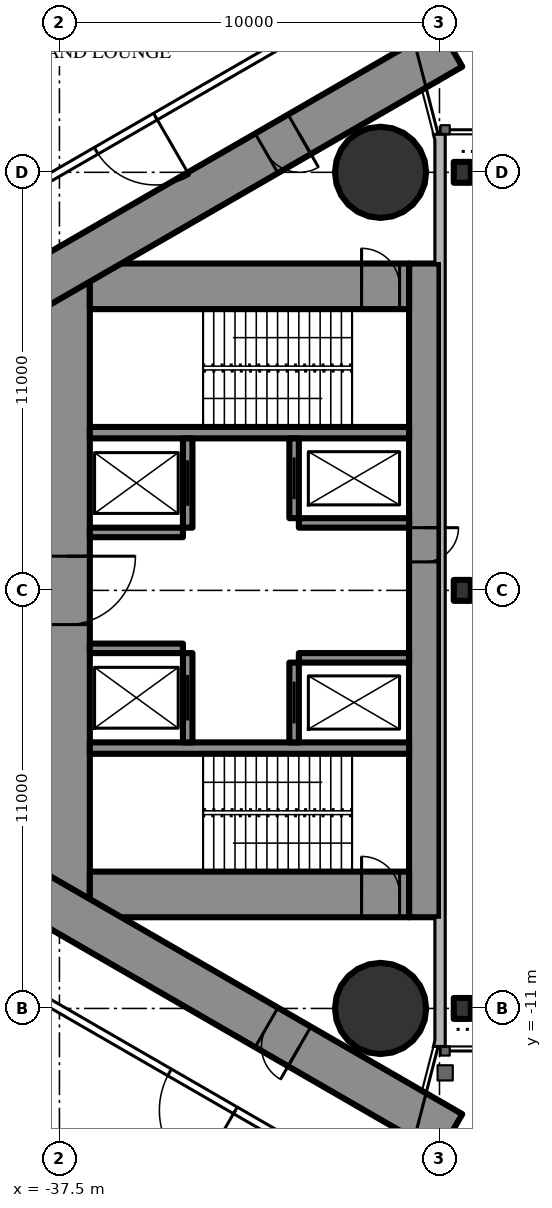
"""IFC4 building model, lengths in metres.
Left out: names, types, materials, properties, quantities, classifications, styles, units other than length and angle.
Written with IfcOpenShell. Run it as: python <this file> out.ifc"""

import sys

from ifc_helpers import new_model, si_unit, direction, frame, frame_2d, origin, origin_2d, place, context, subcontext, project, spatial, rectangle, circle, i_section, extrude, element, fill, save


model = new_model("IFC4")
c1 = context("Model", 3, precision=1e-05, world=origin(), true_north=direction((0.0, 1.0)))
c2 = subcontext(c1, "Body", "Model", "MODEL_VIEW")
j1 = project(units=[si_unit("LENGTHUNIT", "METRE"), si_unit("PLANEANGLEUNIT", "RADIAN")], contexts=[c1])
p1 = place(None, origin())
s1 = spatial("IfcSite", under=j1, at=p1, CompositionType="ELEMENT")
p2 = place(p1, origin())
s2 = spatial("IfcBuilding", under=s1, at=p2, CompositionType="ELEMENT")
p3 = place(p2, frame((0.0, 0.0, 251.9)))
s3 = spatial("IfcBuildingStorey", under=s2, at=p3, CompositionType="ELEMENT", Elevation=251.9)
for number, where, z_axis, x_axis in (
    (1, (-29.05, -11.0, 0.0), (0.0, 0.0, 1.0), (1.0, 0.0, 0.0)),
    (2, (-29.05, 11.0, 0.0), (0.0, 0.0, 1.0), (1.0, 0.0, 0.0)),
):
    element("IfcColumn", number, at=place(p3, frame(where, z_axis=z_axis, x_axis=x_axis)), inside=s3, PredefinedType="COLUMN", context=c2, shape_type="SweptSolid", body=[
        extrude(circle(Radius=1.2, at=origin_2d()), origin(), (0.0, 0.0, 1.0), 5.4),
    ])
p4 = place(p3, frame((-27.9, 8.6, 0.0), z_axis=(0.0, 0.0, 1.0), x_axis=(0.0, -1.0, 0.0)))
e3 = element("IfcWall", 3, at=p4, inside=s3, PredefinedType="SHEAR", context=c2, shape_type="SweptSolid", body=[
    extrude(rectangle(XDim=17.2, YDim=0.8, at=frame_2d((8.6, 0.0))), origin(), (0.0, 0.0, 1.0), 5.4),
])
p5 = place(p4, frame((6.95, 0.0, 0.0)))
e4 = element("IfcOpeningElement", 4, at=p5, cuts=e3, PredefinedType="OPENING", context=c2, shape_type="SweptSolid", body=[
    extrude(rectangle(XDim=0.9, YDim=2.2, at=frame_2d((0.45, 1.1))), frame((0.0, 0.41, 0.0), z_axis=(0.0, -1.0, 0.0), x_axis=(1.0, 0.0, 0.0)), (0.0, 0.0, 1.0), 0.82),
])
p6 = place(p3, frame((-37.3, 8.6, 0.0), z_axis=(0.0, 0.0, 1.0), x_axis=(0.0, -1.0, 0.0)))
e5 = element("IfcWall", 5, at=p6, inside=s3, PredefinedType="SHEAR", context=c2, shape_type="SweptSolid", body=[
    extrude(rectangle(XDim=17.2, YDim=1.2, at=frame_2d((8.6, 0.0))), origin(), (0.0, 0.0, 1.0), 5.4),
])
p7 = place(p6, frame((7.7, 0.0, 0.0)))
e6 = element("IfcOpeningElement", 6, at=p7, cuts=e5, PredefinedType="OPENING", context=c2, shape_type="SweptSolid", body=[
    extrude(rectangle(XDim=1.8, YDim=2.2, at=frame_2d((0.9, 1.1))), frame((0.0, 0.61, 0.0), z_axis=(0.0, -1.0, 0.0), x_axis=(1.0, 0.0, 0.0)), (0.0, 0.0, 1.0), 1.22),
])
p8 = place(p3, frame((-28.3, 8.0, 0.0), z_axis=(0.0, 0.0, 1.0), x_axis=(-1.0, 0.0, 0.0)))
e7 = element("IfcWall", 7, at=p8, inside=s3, PredefinedType="SHEAR", context=c2, shape_type="SweptSolid", body=[
    extrude(rectangle(XDim=8.4, YDim=1.2, at=frame_2d((4.2, 0.0))), origin(), (0.0, 0.0, 1.0), 5.4),
])
p9 = place(p8, frame((0.25, 0.0, 0.0)))
e8 = element("IfcOpeningElement", 8, at=p9, cuts=e7, PredefinedType="OPENING", context=c2, shape_type="SweptSolid", body=[
    extrude(rectangle(XDim=1.0, YDim=2.2, at=frame_2d((0.5, 1.1))), frame((0.0, 0.61, 0.0), z_axis=(0.0, -1.0, 0.0), x_axis=(1.0, 0.0, 0.0)), (0.0, 0.0, 1.0), 1.22),
])
p10 = place(p3, frame((-28.3, -8.0, 0.0), z_axis=(0.0, 0.0, 1.0), x_axis=(-1.0, 0.0, 0.0)))
e9 = element("IfcWall", 9, at=p10, inside=s3, PredefinedType="SHEAR", context=c2, shape_type="SweptSolid", body=[
    extrude(rectangle(XDim=8.4, YDim=1.2, at=frame_2d((4.2, 0.0))), origin(), (0.0, 0.0, 1.0), 5.4),
])
p11 = place(p10, frame((0.25, 0.0, 0.0)))
e10 = element("IfcOpeningElement", 10, at=p11, cuts=e9, PredefinedType="OPENING", context=c2, shape_type="SweptSolid", body=[
    extrude(rectangle(XDim=1.0, YDim=2.2, at=frame_2d((0.5, 1.1))), frame((0.0, 0.61, 0.0), z_axis=(0.0, -1.0, 0.0), x_axis=(1.0, 0.0, 0.0)), (0.0, 0.0, 1.0), 1.22),
])
for number, where, z_axis, x_axis in (
    (11, (-28.3, 4.15, 0.0), (0.0, 0.0, 1.0), (-1.0, 0.0, 0.0)),
    (12, (-28.3, -4.15, 0.0), (0.0, 0.0, 1.0), (-1.0, 0.0, 0.0)),
):
    element("IfcWall", number, at=place(p3, frame(where, z_axis=z_axis, x_axis=x_axis)), inside=s3, PredefinedType="SHEAR", context=c2, shape_type="SweptSolid", body=[
        extrude(rectangle(XDim=8.4, YDim=0.3, at=frame_2d((4.2, 0.0))), origin(), (0.0, 0.0, 1.0), 5.4),
    ])
p12 = place(p3, frame((-31.325, 4.0, 0.0), z_axis=(0.0, 0.0, 1.0), x_axis=(0.0, -1.0, 0.0)))
e13 = element("IfcWall", 13, at=p12, inside=s3, PredefinedType="SHEAR", context=c2, shape_type="SweptSolid", body=[
    extrude(rectangle(XDim=2.1, YDim=0.25, at=frame_2d((1.05, 0.0))), origin(), (0.0, 0.0, 1.0), 5.4),
])
p13 = place(p12, frame((0.5, 0.0, 0.0)))
e14 = element("IfcOpeningElement", 14, at=p13, cuts=e13, PredefinedType="OPENING", context=c2, shape_type="SweptSolid", body=[
    extrude(rectangle(XDim=1.1, YDim=2.2, at=frame_2d((0.55, 1.1))), frame((0.0, 0.135, 0.0), z_axis=(0.0, -1.0, 0.0), x_axis=(1.0, 0.0, 0.0)), (0.0, 0.0, 1.0), 0.27),
])
p14 = place(p3, frame((-34.125, 4.0, 0.0), z_axis=(0.0, 0.0, 1.0), x_axis=(0.0, -1.0, 0.0)))
e15 = element("IfcWall", 15, at=p14, inside=s3, PredefinedType="SHEAR", context=c2, shape_type="SweptSolid", body=[
    extrude(rectangle(XDim=2.35, YDim=0.25, at=frame_2d((1.175, 0.0))), origin(), (0.0, 0.0, 1.0), 5.4),
])
p15 = place(p14, frame((0.575, 0.0, 0.0)))
e16 = element("IfcOpeningElement", 16, at=p15, cuts=e15, PredefinedType="OPENING", context=c2, shape_type="SweptSolid", body=[
    extrude(rectangle(XDim=1.2, YDim=2.2, at=frame_2d((0.6, 1.1))), frame((0.0, 0.135, 0.0), z_axis=(0.0, -1.0, 0.0), x_axis=(1.0, 0.0, 0.0)), (0.0, 0.0, 1.0), 0.27),
])
p16 = place(p3, frame((-28.3, 1.775, 0.0), z_axis=(0.0, 0.0, 1.0), x_axis=(-1.0, 0.0, 0.0)))
e17 = element("IfcWall", 17, at=p16, inside=s3, PredefinedType="SHEAR", context=c2, shape_type="SweptSolid", body=[
    extrude(rectangle(XDim=2.9, YDim=0.25, at=frame_2d((1.45, 0.0))), origin(), (0.0, 0.0, 1.0), 5.4),
])
p17 = place(p3, frame((-34.25, 1.525, 0.0), z_axis=(0.0, 0.0, 1.0), x_axis=(-1.0, 0.0, 0.0)))
e18 = element("IfcWall", 18, at=p17, inside=s3, PredefinedType="SHEAR", context=c2, shape_type="SweptSolid", body=[
    extrude(rectangle(XDim=2.45, YDim=0.25, at=frame_2d((1.225, 0.0))), origin(), (0.0, 0.0, 1.0), 5.4),
])
p18 = place(p3, frame((-31.325, -1.9, 0.0), z_axis=(0.0, 0.0, 1.0), x_axis=(0.0, -1.0, 0.0)))
e19 = element("IfcWall", 19, at=p18, inside=s3, PredefinedType="SHEAR", context=c2, shape_type="SweptSolid", body=[
    extrude(rectangle(XDim=2.1, YDim=0.25, at=frame_2d((1.05, 0.0))), origin(), (0.0, 0.0, 1.0), 5.4),
])
p19 = place(p18, frame((0.5, 0.0, 0.0)))
e20 = element("IfcOpeningElement", 20, at=p19, cuts=e19, PredefinedType="OPENING", context=c2, shape_type="SweptSolid", body=[
    extrude(rectangle(XDim=1.1, YDim=2.2, at=frame_2d((0.55, 1.1))), frame((0.0, 0.135, 0.0), z_axis=(0.0, -1.0, 0.0), x_axis=(1.0, 0.0, 0.0)), (0.0, 0.0, 1.0), 0.27),
])
p20 = place(p3, frame((-34.125, -1.65, 0.0), z_axis=(0.0, 0.0, 1.0), x_axis=(0.0, -1.0, 0.0)))
e21 = element("IfcWall", 21, at=p20, inside=s3, PredefinedType="SHEAR", context=c2, shape_type="SweptSolid", body=[
    extrude(rectangle(XDim=2.35, YDim=0.25, at=frame_2d((1.175, 0.0))), origin(), (0.0, 0.0, 1.0), 5.4),
])
p21 = place(p20, frame((0.575, 0.0, 0.0)))
e22 = element("IfcOpeningElement", 22, at=p21, cuts=e21, PredefinedType="OPENING", context=c2, shape_type="SweptSolid", body=[
    extrude(rectangle(XDim=1.2, YDim=2.2, at=frame_2d((0.6, 1.1))), frame((0.0, 0.135, 0.0), z_axis=(0.0, -1.0, 0.0), x_axis=(1.0, 0.0, 0.0)), (0.0, 0.0, 1.0), 0.27),
])
p22 = place(p3, frame((-28.3, -1.775, 0.0), z_axis=(0.0, 0.0, 1.0), x_axis=(-1.0, 0.0, 0.0)))
e23 = element("IfcWall", 23, at=p22, inside=s3, PredefinedType="SHEAR", context=c2, shape_type="SweptSolid", body=[
    extrude(rectangle(XDim=2.9, YDim=0.25, at=frame_2d((1.45, 0.0))), origin(), (0.0, 0.0, 1.0), 5.4),
])
p23 = place(p3, frame((-34.25, -1.525, 0.0), z_axis=(0.0, 0.0, 1.0), x_axis=(-1.0, 0.0, 0.0)))
e24 = element("IfcWall", 24, at=p23, inside=s3, PredefinedType="SHEAR", context=c2, shape_type="SweptSolid", body=[
    extrude(rectangle(XDim=2.45, YDim=0.25, at=frame_2d((1.225, 0.0))), origin(), (0.0, 0.0, 1.0), 5.4),
])
p24 = place(p3, frame((-27.2, 14.3, 0.0), z_axis=(0.0, 0.0, 1.0), x_axis=(-0.866026593062, -0.499997940104, 0.0)))
e25 = element("IfcWall", 25, at=p24, inside=s3, PredefinedType="SHEAR", context=c2, shape_type="SweptSolid", body=[
    extrude(rectangle(XDim=28.946, YDim=1.2, at=frame_2d((14.473, 0.0))), origin(), (0.0, 0.0, 1.0), 5.4),
])
p25 = place(p24, frame((4.6, 0.0, 0.0)))
e26 = element("IfcOpeningElement", 26, at=p25, cuts=e25, PredefinedType="OPENING", context=c2, shape_type="SweptSolid", body=[
    extrude(rectangle(XDim=1.0, YDim=2.2, at=frame_2d((0.5, 1.1))), frame((0.0, 0.61, 0.0), z_axis=(0.0, -1.0, 0.0), x_axis=(1.0, 0.0, 0.0)), (0.0, 0.0, 1.0), 1.22),
])
p26 = place(p24, frame((13.395, 0.0, 0.0)))
e27 = element("IfcOpeningElement", 27, at=p26, cuts=e25, PredefinedType="OPENING", context=c2, shape_type="SweptSolid", body=[
    extrude(rectangle(XDim=1.8, YDim=2.2, at=frame_2d((0.9, 1.1))), frame((0.0, 0.61, 0.0), z_axis=(0.0, -1.0, 0.0), x_axis=(1.0, 0.0, 0.0)), (0.0, 0.0, 1.0), 1.22),
])
p27 = place(p3, frame((-27.2, -14.3, 0.0), z_axis=(0.0, 0.0, 1.0), x_axis=(-0.866024021859, 0.500002393557, 0.0)))
e28 = element("IfcWall", 28, at=p27, inside=s3, PredefinedType="SHEAR", context=c2, shape_type="SweptSolid", body=[
    extrude(rectangle(XDim=27.907, YDim=1.2, at=frame_2d((13.954, 0.0))), origin(), (0.0, 0.0, 1.0), 5.4),
])
p28 = place(p27, frame((4.6, 0.0, 0.0)))
e29 = element("IfcOpeningElement", 29, at=p28, cuts=e28, PredefinedType="OPENING", context=c2, shape_type="SweptSolid", body=[
    extrude(rectangle(XDim=1.0, YDim=2.2, at=frame_2d((0.5, 1.1))), frame((0.0, 0.61, 0.0), z_axis=(0.0, -1.0, 0.0), x_axis=(1.0, 0.0, 0.0)), (0.0, 0.0, 1.0), 1.22),
])
p29 = place(p27, frame((13.395, 0.0, 0.0)))
e30 = element("IfcOpeningElement", 30, at=p29, cuts=e28, PredefinedType="OPENING", context=c2, shape_type="SweptSolid", body=[
    extrude(rectangle(XDim=1.8, YDim=2.2, at=frame_2d((0.9, 1.1))), frame((0.0, 0.61, 0.0), z_axis=(0.0, -1.0, 0.0), x_axis=(1.0, 0.0, 0.0)), (0.0, 0.0, 1.0), 1.22),
])
for number, where, z_axis, x_axis in (
    (31, (-26.9, -11.0, 0.0), (0.0, 0.0, 1.0), (1.0, 0.0, 0.0)),
    (32, (-26.9, 0.0, 0.0), (0.0, 0.0, 1.0), (1.0, 0.0, 0.0)),
    (33, (-26.9, 11.0, 0.0), (0.0, 0.0, 1.0), (1.0, 0.0, 0.0)),
):
    element("IfcColumn", number, at=place(p3, frame(where, z_axis=z_axis, x_axis=x_axis)), inside=s3, PredefinedType="COLUMN", context=c2, shape_type="SweptSolid", body=[
        extrude(i_section(OverallWidth=0.448, OverallDepth=0.55, WebThickness=0.072, FlangeThickness=0.115, FilletRadius=0.02, at=origin_2d()), origin(), (0.0, 0.0, 1.0), 5.4),
    ])
p30 = place(p3, frame((-28.681, 16.101, 0.0), z_axis=(0.0, 0.0, 1.0), x_axis=(-0.866024860443, -0.500000941094, 0.0)))
e34 = element("IfcWall", 34, at=p30, inside=s3, PredefinedType="PARTITIONING", context=c2, shape_type="SweptSolid", body=[
    extrude(rectangle(XDim=32.201, YDim=0.2, at=frame_2d((16.101, 0.0))), origin(), (0.0, 0.0, 1.0), 5.15),
])
p31 = place(p30, frame((7.266, 0.0, 0.0)))
e35 = element("IfcOpeningElement", 35, at=p31, cuts=e34, PredefinedType="OPENING", context=c2, shape_type="SweptSolid", body=[
    extrude(rectangle(XDim=1.8, YDim=2.2, at=frame_2d((0.9, 1.1))), frame((0.0, 0.11, 0.0), z_axis=(0.0, -1.0, 0.0), x_axis=(1.0, 0.0, 0.0)), (0.0, 0.0, 1.0), 0.22),
])
p32 = place(p30, frame((17.182, 0.0, 0.0)))
e36 = element("IfcOpeningElement", 36, at=p32, cuts=e34, PredefinedType="OPENING", context=c2, shape_type="SweptSolid", body=[
    extrude(rectangle(XDim=2.0, YDim=2.4, at=frame_2d((1.0, 1.2))), frame((0.0, 0.11, 0.0), z_axis=(0.0, -1.0, 0.0), x_axis=(1.0, 0.0, 0.0)), (0.0, 0.0, 1.0), 0.22),
])
p33 = place(p30, frame((21.43, 0.0, 0.0)))
e37 = element("IfcOpeningElement", 37, at=p33, cuts=e34, PredefinedType="OPENING", context=c2, shape_type="SweptSolid", body=[
    extrude(rectangle(XDim=1.8, YDim=2.2, at=frame_2d((0.9, 1.1))), frame((0.0, 0.11, 0.0), z_axis=(0.0, -1.0, 0.0), x_axis=(1.0, 0.0, 0.0)), (0.0, 0.0, 1.0), 0.22),
])
p34 = place(p30, frame((27.29, 0.0, 0.0)))
e38 = element("IfcOpeningElement", 38, at=p34, cuts=e34, PredefinedType="OPENING", context=c2, shape_type="SweptSolid", body=[
    extrude(rectangle(XDim=1.8, YDim=2.2, at=frame_2d((0.9, 1.1))), frame((0.0, 0.11, 0.0), z_axis=(0.0, -1.0, 0.0), x_axis=(1.0, 0.0, 0.0)), (0.0, 0.0, 1.0), 0.22),
])
p35 = place(p3, frame((-28.681, -16.101, 0.0), z_axis=(0.0, 0.0, 1.0), x_axis=(-0.866026079773, 0.499998829152, 0.0)))
e39 = element("IfcWall", 39, at=p35, inside=s3, PredefinedType="PARTITIONING", context=c2, shape_type="SweptSolid", body=[
    extrude(rectangle(XDim=11.674, YDim=0.2, at=frame_2d((5.837, 0.0))), origin(), (0.0, 0.0, 1.0), 5.15),
])
p36 = place(p35, frame((4.837, 0.0, 0.0)))
e40 = element("IfcOpeningElement", 40, at=p36, cuts=e39, PredefinedType="OPENING", context=c2, shape_type="SweptSolid", body=[
    extrude(rectangle(XDim=2.0, YDim=2.4, at=frame_2d((1.0, 1.2))), frame((0.0, 0.11, 0.0), z_axis=(0.0, -1.0, 0.0), x_axis=(1.0, 0.0, 0.0)), (0.0, 0.0, 1.0), 0.22),
])
p37 = place(p31, origin())
e41 = element("IfcDoor", 41, at=p37, inside=s3, OperationType="DOUBLE_DOOR_SINGLE_SWING", PredefinedType="DOOR", context=c2, shape_type="SweptSolid", body=[
    extrude(rectangle(XDim=1.8, YDim=2.2, at=frame_2d((0.9, 1.1))), frame((0.0, 0.025, 0.0), z_axis=(0.0, -1.0, 0.0), x_axis=(1.0, 0.0, 0.0)), (0.0, 0.0, 1.0), 0.05),
])
fill(e35, e41)
p38 = place(p36, origin())
e42 = element("IfcDoor", 42, at=p38, inside=s3, OperationType="DOUBLE_DOOR_SINGLE_SWING", PredefinedType="DOOR", context=c2, shape_type="SweptSolid", body=[
    extrude(rectangle(XDim=2.0, YDim=2.4, at=frame_2d((1.0, 1.2))), frame((0.0, 0.025, 0.0), z_axis=(0.0, -1.0, 0.0), x_axis=(1.0, 0.0, 0.0)), (0.0, 0.0, 1.0), 0.05),
])
fill(e40, e42)
p39 = place(p25, origin())
e43 = element("IfcDoor", 43, at=p39, inside=s3, OperationType="SINGLE_SWING_LEFT", PredefinedType="DOOR", context=c2, shape_type="SweptSolid", body=[
    extrude(rectangle(XDim=1.0, YDim=2.2, at=frame_2d((0.5, 1.1))), frame((0.0, 0.025, 0.0), z_axis=(0.0, -1.0, 0.0), x_axis=(1.0, 0.0, 0.0)), (0.0, 0.0, 1.0), 0.05),
])
fill(e26, e43)
p40 = place(p28, origin())
e44 = element("IfcDoor", 44, at=p40, inside=s3, OperationType="SINGLE_SWING_LEFT", PredefinedType="DOOR", context=c2, shape_type="SweptSolid", body=[
    extrude(rectangle(XDim=1.0, YDim=2.2, at=frame_2d((0.5, 1.1))), frame((0.0, 0.025, 0.0), z_axis=(0.0, -1.0, 0.0), x_axis=(1.0, 0.0, 0.0)), (0.0, 0.0, 1.0), 0.05),
])
fill(e29, e44)
p41 = place(p7, origin())
e45 = element("IfcDoor", 45, at=p41, inside=s3, OperationType="DOUBLE_DOOR_SINGLE_SWING", PredefinedType="DOOR", context=c2, shape_type="SweptSolid", body=[
    extrude(rectangle(XDim=1.8, YDim=2.2, at=frame_2d((0.9, 1.1))), frame((0.0, 0.025, 0.0), z_axis=(0.0, -1.0, 0.0), x_axis=(1.0, 0.0, 0.0)), (0.0, 0.0, 1.0), 0.05),
])
fill(e6, e45)
p42 = place(p9, origin())
e46 = element("IfcDoor", 46, at=p42, inside=s3, OperationType="SINGLE_SWING_RIGHT", PredefinedType="DOOR", context=c2, shape_type="SweptSolid", body=[
    extrude(rectangle(XDim=1.0, YDim=2.2, at=frame_2d((0.5, 1.1))), frame((0.0, 0.025, 0.0), z_axis=(0.0, -1.0, 0.0), x_axis=(1.0, 0.0, 0.0)), (0.0, 0.0, 1.0), 0.05),
])
fill(e8, e46)
p43 = place(p11, origin())
e47 = element("IfcDoor", 47, at=p43, inside=s3, OperationType="SINGLE_SWING_RIGHT", PredefinedType="DOOR", context=c2, shape_type="SweptSolid", body=[
    extrude(rectangle(XDim=1.0, YDim=2.2, at=frame_2d((0.5, 1.1))), frame((0.0, 0.025, 0.0), z_axis=(0.0, -1.0, 0.0), x_axis=(1.0, 0.0, 0.0)), (0.0, 0.0, 1.0), 0.05),
])
fill(e10, e47)
p44 = place(p5, origin())
e48 = element("IfcDoor", 48, at=p44, inside=s3, OperationType="SINGLE_SWING_LEFT", PredefinedType="DOOR", context=c2, shape_type="SweptSolid", body=[
    extrude(rectangle(XDim=0.9, YDim=2.2, at=frame_2d((0.45, 1.1))), frame((0.0, 0.025, 0.0), z_axis=(0.0, -1.0, 0.0), x_axis=(1.0, 0.0, 0.0)), (0.0, 0.0, 1.0), 0.05),
])
fill(e4, e48)
p45 = place(p13, origin())
e49 = element("IfcDoor", 49, at=p45, inside=s3, OperationType="SLIDING_TO_LEFT", PredefinedType="USERDEFINED", context=c2, shape_type="SweptSolid", body=[
    extrude(rectangle(XDim=1.1, YDim=2.2, at=frame_2d((0.55, 1.1))), frame((0.0, 0.025, 0.0), z_axis=(0.0, -1.0, 0.0), x_axis=(1.0, 0.0, 0.0)), (0.0, 0.0, 1.0), 0.05),
])
fill(e14, e49)
p46 = place(p19, origin())
e50 = element("IfcDoor", 50, at=p46, inside=s3, OperationType="SLIDING_TO_LEFT", PredefinedType="USERDEFINED", context=c2, shape_type="SweptSolid", body=[
    extrude(rectangle(XDim=1.1, YDim=2.2, at=frame_2d((0.55, 1.1))), frame((0.0, 0.025, 0.0), z_axis=(0.0, -1.0, 0.0), x_axis=(1.0, 0.0, 0.0)), (0.0, 0.0, 1.0), 0.05),
])
fill(e20, e50)
p47 = place(p15, origin())
e51 = element("IfcDoor", 51, at=p47, inside=s3, OperationType="DOUBLE_DOOR_SLIDING", PredefinedType="USERDEFINED", context=c2, shape_type="SweptSolid", body=[
    extrude(rectangle(XDim=1.2, YDim=2.2, at=frame_2d((0.6, 1.1))), frame((0.0, 0.025, 0.0), z_axis=(0.0, -1.0, 0.0), x_axis=(1.0, 0.0, 0.0)), (0.0, 0.0, 1.0), 0.05),
])
fill(e16, e51)
p48 = place(p21, origin())
e52 = element("IfcDoor", 52, at=p48, inside=s3, OperationType="DOUBLE_DOOR_SLIDING", PredefinedType="USERDEFINED", context=c2, shape_type="SweptSolid", body=[
    extrude(rectangle(XDim=1.2, YDim=2.2, at=frame_2d((0.6, 1.1))), frame((0.0, 0.025, 0.0), z_axis=(0.0, -1.0, 0.0), x_axis=(1.0, 0.0, 0.0)), (0.0, 0.0, 1.0), 0.05),
])
fill(e22, e52)
save(model, sys.argv[1])
